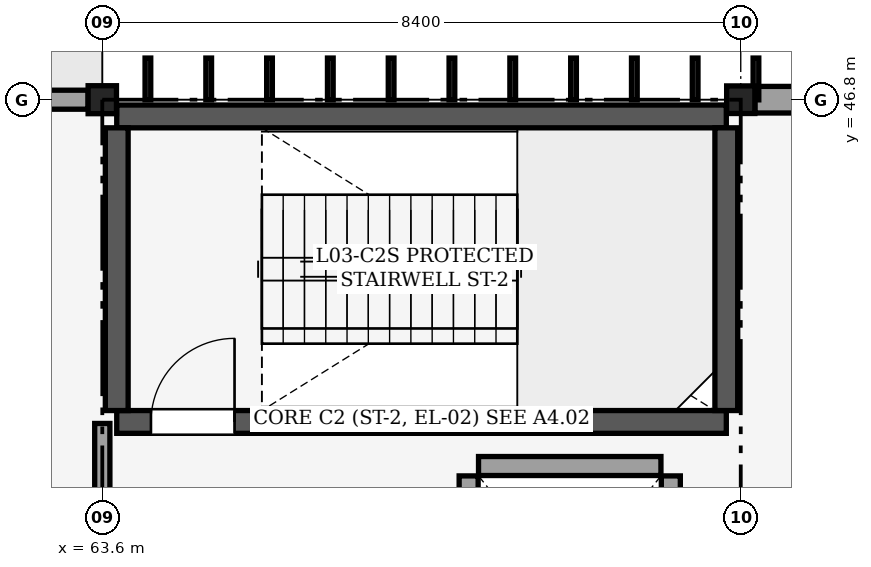
"""IFC4 building model, lengths in metres.
Left out: names, types, materials, properties, quantities, classifications, styles, units other than length and angle.
Written with IfcOpenShell. Run it as: python <this file> out.ifc"""

import sys

from ifc_helpers import new_model, si_unit, direction, frame, frame_2d, origin, origin_2d, place, context, subcontext, project, spatial, rectangle, i_section, extrude, element, fill, save


model = new_model("IFC4")
c1 = context("Model", 3, precision=1e-05, world=origin(), true_north=direction((0.0, 1.0)))
c2 = subcontext(c1, "Body", "Model", "MODEL_VIEW")
j1 = project(units=[si_unit("LENGTHUNIT", "METRE"), si_unit("PLANEANGLEUNIT", "RADIAN")], contexts=[c1])
p1 = place(None, origin())
s1 = spatial("IfcSite", under=j1, at=p1, CompositionType="ELEMENT")
p2 = place(p1, origin())
s2 = spatial("IfcBuilding", under=s1, at=p2, CompositionType="ELEMENT")
p3 = place(p2, frame((0.0, 0.0, 15.0)))
s3 = spatial("IfcBuildingStorey", under=s2, at=p3, CompositionType="ELEMENT", Elevation=15.0)
p4 = place(p3, frame((63.6, 46.8, 0.0), z_axis=(0.0, 0.0, 1.0), x_axis=(1.0, 0.0, 0.0)))
e1 = element("IfcColumn", 1, at=p4, inside=s3, PredefinedType="COLUMN", context=c2, shape_type="SweptSolid", body=[
    extrude(i_section(OverallWidth=0.373, OverallDepth=0.368, WebThickness=0.015, FlangeThickness=0.024, FilletRadius=0.025, at=origin_2d()), origin(), (0.0, 0.0, 1.0), 4.8),
])
p5 = place(p3, frame((72.0, 46.8, 0.0), z_axis=(0.0, 0.0, 1.0), x_axis=(1.0, 0.0, 0.0)))
e2 = element("IfcColumn", 2, at=p5, inside=s3, PredefinedType="COLUMN", context=c2, shape_type="SweptSolid", body=[
    extrude(i_section(OverallWidth=0.371, OverallDepth=0.363, WebThickness=0.013, FlangeThickness=0.022, FilletRadius=0.025, at=origin_2d()), origin(), (0.0, 0.0, 1.0), 4.8),
])
p6 = place(p3, frame((55.386, 46.8, 0.0), z_axis=(0.0, 0.0, 1.0), x_axis=(1.0, 0.0, 0.0)))
e3 = element("IfcWall", 3, at=p6, inside=s3, PredefinedType="SOLIDWALL", context=c2, shape_type="SweptSolid", body=[
    extrude(rectangle(XDim=8.027, YDim=0.25, at=frame_2d((4.014, 0.0))), origin(), (0.0, 0.0, 1.0), 4.215),
])
p7 = place(p6, frame((2.813, 0.0, 0.9)))
e4 = element("IfcOpeningElement", 4, at=p7, cuts=e3, PredefinedType="OPENING", context=c2, shape_type="SweptSolid", body=[
    extrude(rectangle(XDim=2.4, YDim=1.75, at=frame_2d((1.2, 0.875))), frame((0.0, 0.135, 0.0), z_axis=(0.0, -1.0, 0.0), x_axis=(1.0, 0.0, 0.0)), (0.0, 0.0, 1.0), 0.271),
])
p8 = place(p3, frame((72.186, 46.8, 0.0), z_axis=(0.0, 0.0, 1.0), x_axis=(1.0, 0.0, 0.0)))
e5 = element("IfcWall", 5, at=p8, inside=s3, PredefinedType="SOLIDWALL", context=c2, shape_type="SweptSolid", body=[
    extrude(rectangle(XDim=8.031, YDim=0.35, at=frame_2d((4.015, 0.0))), origin(), (0.0, 0.0, 1.0), 3.827),
])
p9 = place(p8, frame((2.665, 0.0, 0.9)))
e6 = element("IfcOpeningElement", 6, at=p9, cuts=e5, PredefinedType="OPENING", context=c2, shape_type="SweptSolid", body=[
    extrude(rectangle(XDim=2.7, YDim=1.75, at=frame_2d((1.35, 0.875))), frame((0.0, 0.185, 0.0), z_axis=(0.0, -1.0, 0.0), x_axis=(1.0, 0.0, 0.0)), (0.0, 0.0, 1.0), 0.371),
])
p10 = place(p3, frame((63.79, 42.56, 0.0), z_axis=(0.0, 0.0, 1.0), x_axis=(1.0, 0.0, 0.0)))
e7 = element("IfcWall", 7, at=p10, inside=s3, PredefinedType="SHEAR", context=c2, shape_type="SweptSolid", body=[
    extrude(rectangle(XDim=8.02, YDim=0.3, at=frame_2d((4.01, 0.0))), origin(), (0.0, 0.0, 1.0), 4.54),
])
p11 = place(p10, frame((0.45, 0.0, 0.0)))
e8 = element("IfcOpeningElement", 8, at=p11, cuts=e7, PredefinedType="OPENING", context=c2, shape_type="SweptSolid", body=[
    extrude(rectangle(XDim=1.1, YDim=2.15, at=frame_2d((0.55, 1.075))), frame((0.0, 0.16, 0.0), z_axis=(0.0, -1.0, 0.0), x_axis=(1.0, 0.0, 0.0)), (0.0, 0.0, 1.0), 0.321),
])
p12 = place(p3, frame((63.79, 46.58, 0.0), z_axis=(0.0, 0.0, 1.0), x_axis=(1.0, 0.0, 0.0)))
e9 = element("IfcWall", 9, at=p12, inside=s3, PredefinedType="SHEAR", context=c2, shape_type="SweptSolid", body=[
    extrude(rectangle(XDim=8.02, YDim=0.3, at=frame_2d((4.01, 0.0))), origin(), (0.0, 0.0, 1.0), 4.54),
])
for number, where, z_axis, x_axis in (
    (10, (63.79, 42.71, 0.0), (0.0, 0.0, 1.0), (0.0, 1.0, 0.0)),
    (11, (71.81, 42.71, 0.0), (0.0, 0.0, 1.0), (0.0, 1.0, 0.0)),
):
    element("IfcWall", number, at=place(p3, frame(where, z_axis=z_axis, x_axis=x_axis)), inside=s3, PredefinedType="SHEAR", context=c2, shape_type="SweptSolid", body=[
        extrude(rectangle(XDim=3.72, YDim=0.3, at=frame_2d((1.86, 0.0))), origin(), (0.0, 0.0, 1.0), 4.54),
    ])
p13 = place(p3, frame((71.08, 38.85, 0.0), z_axis=(0.0, 0.0, 1.0), x_axis=(0.0, 1.0, 0.0)))
e12 = element("IfcWall", 12, at=p13, inside=s3, PredefinedType="PARTITIONING", context=c2, shape_type="SweptSolid", body=[
    extrude(rectangle(XDim=3.0, YDim=0.25, at=frame_2d((1.5, 0.0))), origin(), (0.0, 0.0, 1.0), 4.54),
])
p14 = place(p3, frame((68.55, 41.98, 0.0), z_axis=(0.0, 0.0, 1.0), x_axis=(1.0, 0.0, 0.0)))
e13 = element("IfcWall", 13, at=p14, inside=s3, PredefinedType="PARTITIONING", context=c2, shape_type="SweptSolid", body=[
    extrude(rectangle(XDim=2.4, YDim=0.25, at=frame_2d((1.2, 0.0))), origin(), (0.0, 0.0, 1.0), 4.54),
])
p15 = place(p3, frame((68.42, 38.5, 0.0), z_axis=(0.0, 0.0, 1.0), x_axis=(0.0, 1.0, 0.0)))
e14 = element("IfcWall", 14, at=p15, inside=s3, PredefinedType="PARTITIONING", context=c2, shape_type="SweptSolid", body=[
    extrude(rectangle(XDim=3.35, YDim=0.25, at=frame_2d((1.675, 0.0))), origin(), (0.0, 0.0, 1.0), 4.54),
])
p16 = place(p15, frame((0.85, 0.0, 0.0)))
e15 = element("IfcOpeningElement", 15, at=p16, cuts=e14, PredefinedType="OPENING", context=c2, shape_type="SweptSolid", body=[
    extrude(rectangle(XDim=1.25, YDim=2.15, at=frame_2d((0.625, 1.075))), frame((0.0, 0.135, 0.0), z_axis=(0.0, -1.0, 0.0), x_axis=(1.0, 0.0, 0.0)), (0.0, 0.0, 1.0), 0.271),
])
p17 = place(p3, frame((63.6, 38.62, 0.0), z_axis=(0.0, 0.0, 1.0), x_axis=(0.0, 1.0, 0.0)))
e16 = element("IfcWall", 16, at=p17, inside=s3, PredefinedType="PARTITIONING", context=c2, shape_type="SweptSolid", body=[
    extrude(rectangle(XDim=3.92, YDim=0.2, at=frame_2d((1.96, 0.0))), origin(), (0.0, 0.0, 1.0), 3.593),
])
p18 = place(p11, origin())
e17 = element("IfcDoor", 17, at=p18, inside=s3, OperationType="SINGLE_SWING_RIGHT", PredefinedType="DOOR", context=c2, shape_type="SweptSolid", body=[
    extrude(rectangle(XDim=1.1, YDim=2.15, at=frame_2d((0.55, 1.075))), frame((0.0, 0.025, 0.0), z_axis=(0.0, -1.0, 0.0), x_axis=(1.0, 0.0, 0.0)), (0.0, 0.0, 1.0), 0.05),
])
fill(e8, e17)
save(model, sys.argv[1])
